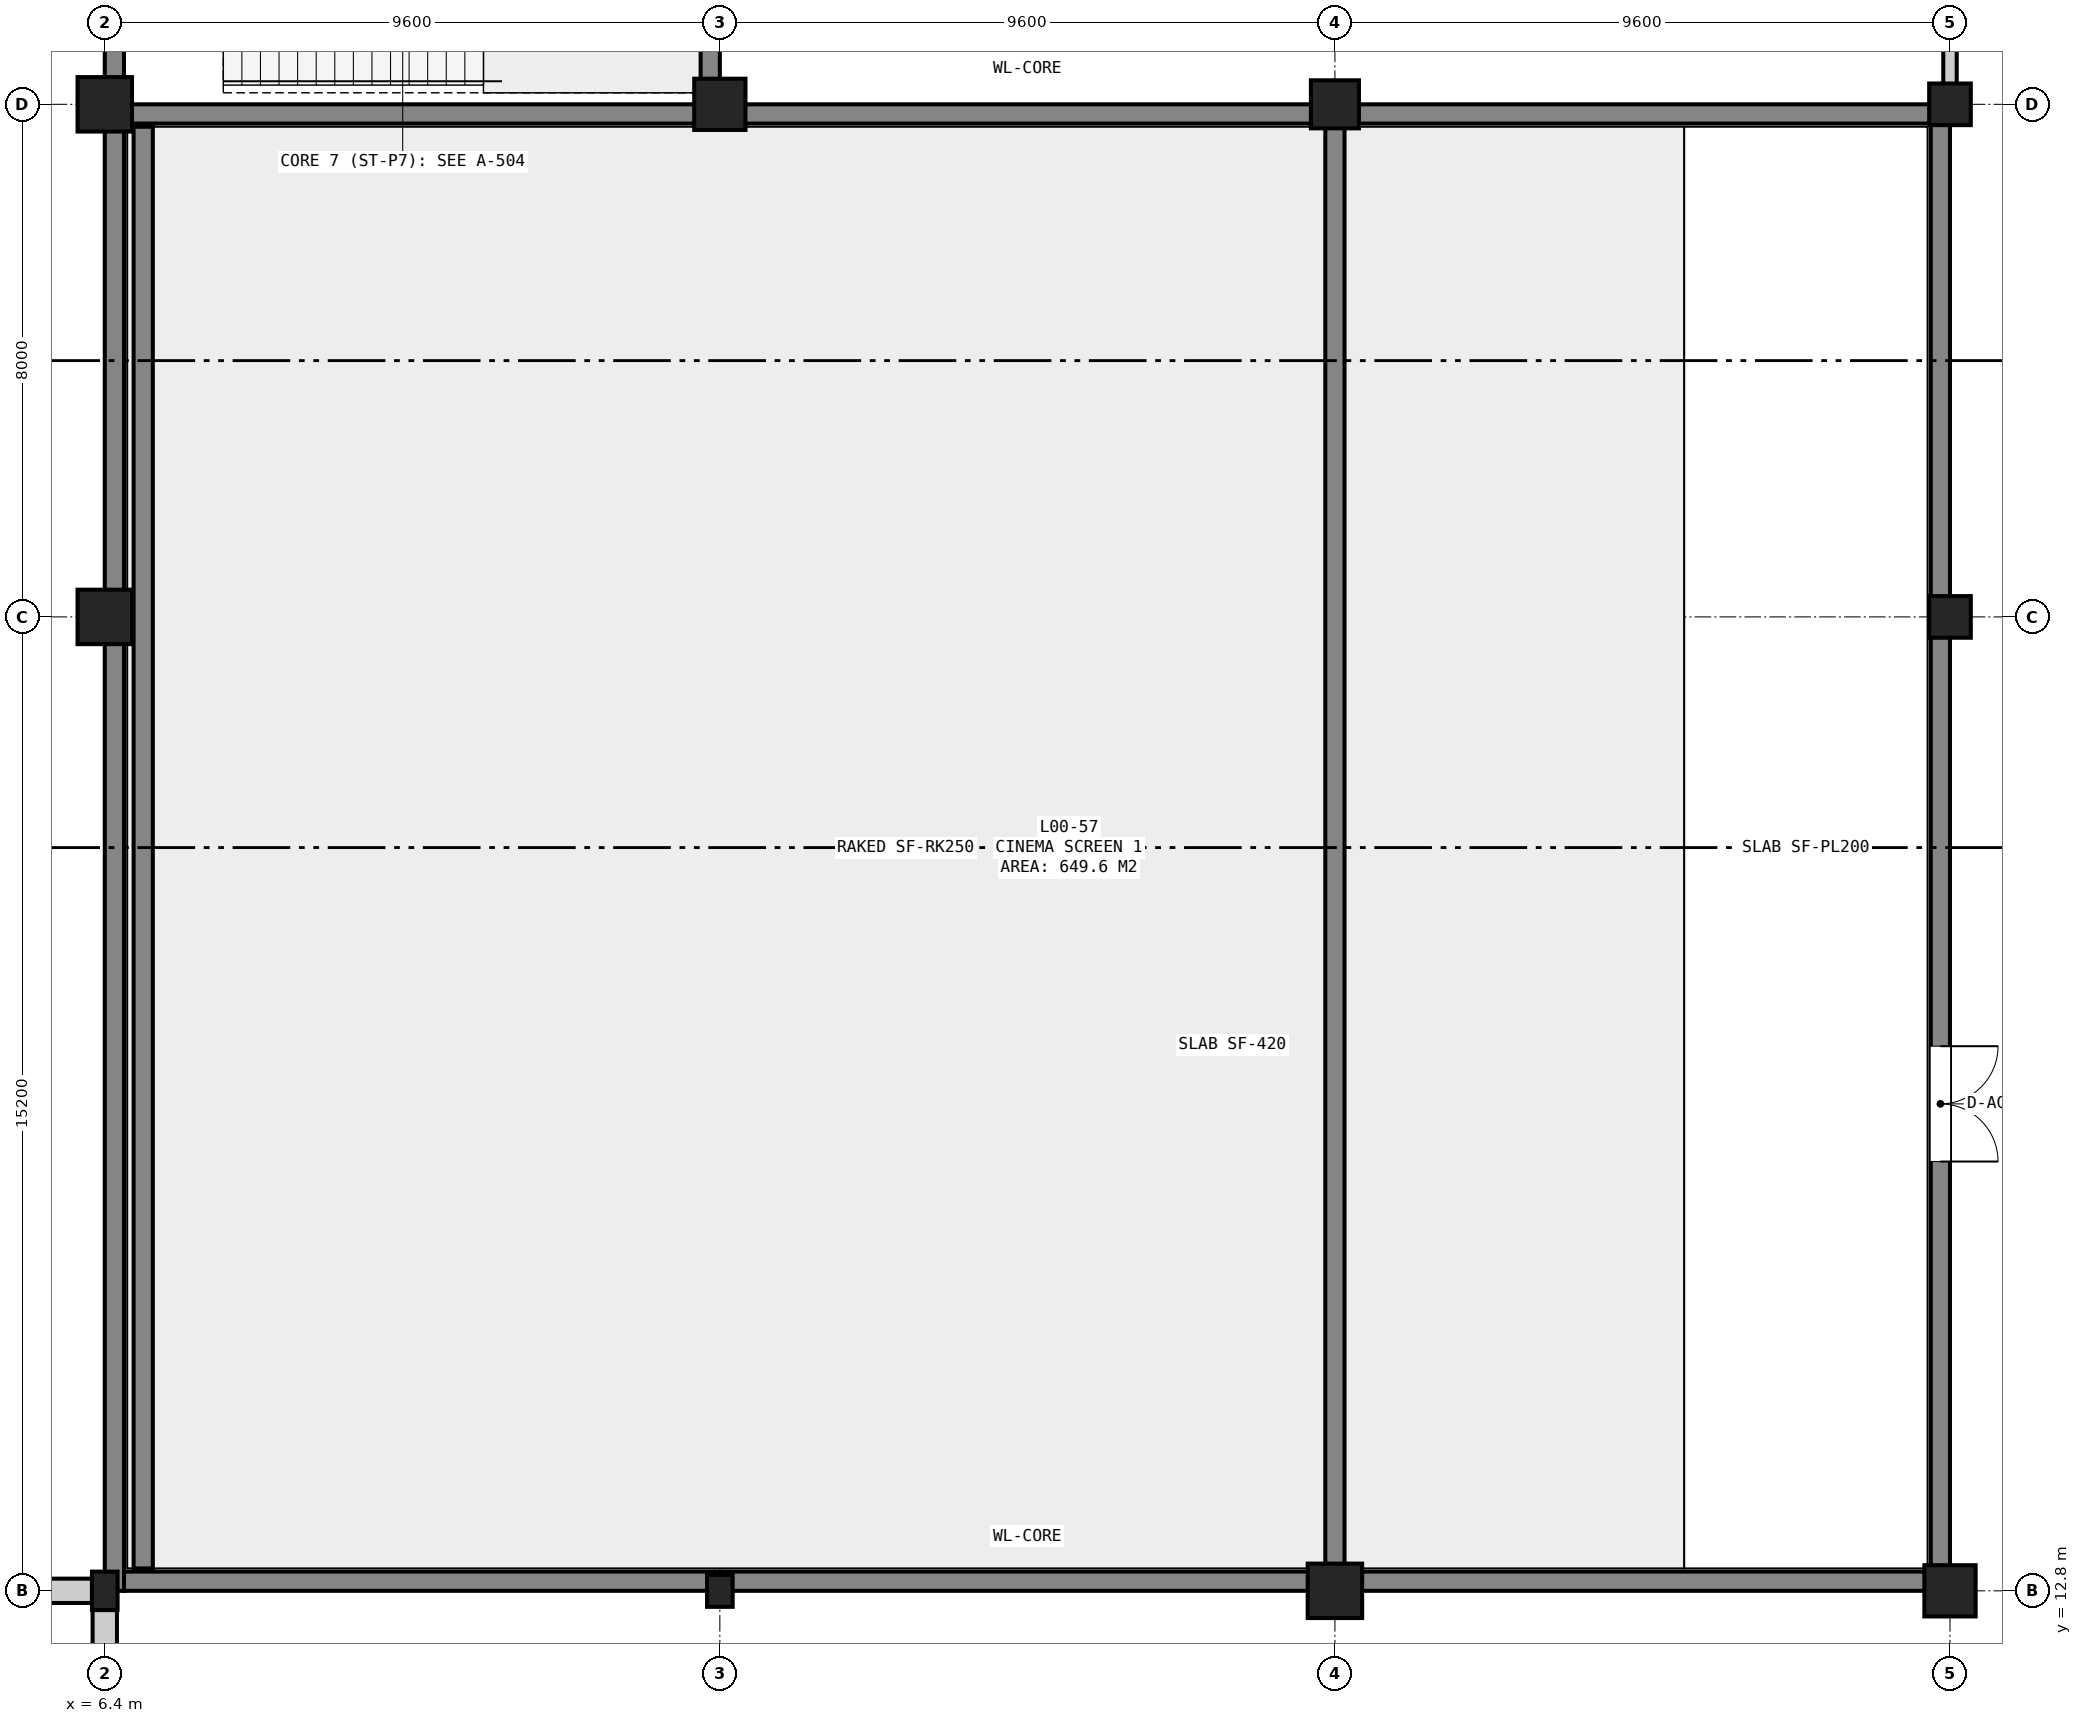
"""IFC4 building model, lengths in metres.
Left out: names, types, materials, properties, quantities, classifications, styles, units other than length and angle.
Written with IfcOpenShell. Run it as: python <this file> out.ifc"""

import sys

from ifc_helpers import new_model, si_unit, direction, frame, frame_2d, origin, origin_2d, place, context, subcontext, project, spatial, rectangle, extrude, element, fill, save


model = new_model("IFC4")
c1 = context("Model", 3, precision=1e-05, world=origin(), true_north=direction((0.0, 1.0)))
c2 = subcontext(c1, "Body", "Model", "MODEL_VIEW")
j1 = project(units=[si_unit("LENGTHUNIT", "METRE"), si_unit("PLANEANGLEUNIT", "RADIAN")], contexts=[c1])
p1 = place(None, origin())
s1 = spatial("IfcSite", under=j1, at=p1, CompositionType="ELEMENT")
p2 = place(p1, origin())
s2 = spatial("IfcBuilding", under=s1, at=p2, CompositionType="ELEMENT")
p3 = place(p2, origin())
s3 = spatial("IfcBuildingStorey", under=s2, at=p3, CompositionType="ELEMENT", Elevation=0.0)
p4 = place(p3, frame((6.4, 12.8, 0.0), z_axis=(0.0, 0.0, 1.0), x_axis=(1.0, 0.0, 0.0)))
e1 = element("IfcColumn", 1, at=p4, inside=s3, PredefinedType="COLUMN", context=c2, shape_type="SweptSolid", body=[
    extrude(rectangle(XDim=0.4, YDim=0.6, at=origin_2d()), origin(), (0.0, 0.0, 1.0), 5.4),
])
for number, where, z_axis, x_axis in (
    (2, (6.4, 28.0, 0.0), (0.0, 0.0, 1.0), (1.0, 0.0, 0.0)),
    (3, (6.4, 36.0, 0.0), (0.0, 0.0, 1.0), (1.0, 0.0, 0.0)),
):
    element("IfcColumn", number, at=place(p3, frame(where, z_axis=z_axis, x_axis=x_axis)), inside=s3, PredefinedType="COLUMN", context=c2, shape_type="SweptSolid", body=[
        extrude(rectangle(XDim=0.85, YDim=0.85, at=origin_2d()), origin(), (0.0, 0.0, 1.0), 5.4),
    ])
p5 = place(p3, frame((16.0, 12.8, 0.0), z_axis=(0.0, 0.0, 1.0), x_axis=(1.0, 0.0, 0.0)))
e4 = element("IfcColumn", 4, at=p5, inside=s3, PredefinedType="COLUMN", context=c2, shape_type="SweptSolid", body=[
    extrude(rectangle(XDim=0.4, YDim=0.5, at=origin_2d()), origin(), (0.0, 0.0, 1.0), 5.4),
])
p6 = place(p3, frame((16.0, 36.0, 0.0), z_axis=(0.0, 0.0, 1.0), x_axis=(1.0, 0.0, 0.0)))
e5 = element("IfcColumn", 5, at=p6, inside=s3, PredefinedType="COLUMN", context=c2, shape_type="SweptSolid", body=[
    extrude(rectangle(XDim=0.8, YDim=0.8, at=origin_2d()), origin(), (0.0, 0.0, 1.0), 5.4),
])
p7 = place(p3, frame((25.6, 12.8, 0.0), z_axis=(0.0, 0.0, 1.0), x_axis=(1.0, 0.0, 0.0)))
e6 = element("IfcColumn", 6, at=p7, inside=s3, PredefinedType="COLUMN", context=c2, shape_type="SweptSolid", body=[
    extrude(rectangle(XDim=0.85, YDim=0.85, at=origin_2d()), origin(), (0.0, 0.0, 1.0), 5.4),
])
p8 = place(p3, frame((25.6, 36.0, 0.0), z_axis=(0.0, 0.0, 1.0), x_axis=(1.0, 0.0, 0.0)))
e7 = element("IfcColumn", 7, at=p8, inside=s3, PredefinedType="COLUMN", context=c2, shape_type="SweptSolid", body=[
    extrude(rectangle(XDim=0.75, YDim=0.75, at=origin_2d()), origin(), (0.0, 0.0, 1.0), 5.4),
])
p9 = place(p3, frame((35.2, 12.8, 0.0), z_axis=(0.0, 0.0, 1.0), x_axis=(1.0, 0.0, 0.0)))
e8 = element("IfcColumn", 8, at=p9, inside=s3, PredefinedType="COLUMN", context=c2, shape_type="SweptSolid", body=[
    extrude(rectangle(XDim=0.8, YDim=0.8, at=origin_2d()), origin(), (0.0, 0.0, 1.0), 5.4),
])
for number, where, z_axis, x_axis in (
    (9, (35.2, 28.0, 0.0), (0.0, 0.0, 1.0), (1.0, 0.0, 0.0)),
    (10, (35.2, 36.0, 0.0), (0.0, 0.0, 1.0), (1.0, 0.0, 0.0)),
):
    element("IfcColumn", number, at=place(p3, frame(where, z_axis=z_axis, x_axis=x_axis)), inside=s3, PredefinedType="COLUMN", context=c2, shape_type="SweptSolid", body=[
        extrude(rectangle(XDim=0.65, YDim=0.65, at=origin_2d()), origin(), (0.0, 0.0, 1.0), 5.4),
    ])
p10 = place(p3, frame((25.6, 13.15, 0.0), z_axis=(0.0, 0.0, 1.0), x_axis=(0.0, 1.0, 0.0)))
e11 = element("IfcWall", 11, at=p10, inside=s3, PredefinedType="SHEAR", context=c2, shape_type="SweptSolid", body=[
    extrude(rectangle(XDim=22.5, YDim=0.3, at=frame_2d((11.25, 0.0))), origin(), (0.0, 0.0, 1.0), 0.784),
])
p11 = place(p3, frame((7.0, 13.15, 0.0), z_axis=(0.0, 0.0, 1.0), x_axis=(0.0, 1.0, 0.0)))
e12 = element("IfcWall", 12, at=p11, inside=s3, PredefinedType="SHEAR", context=c2, shape_type="SweptSolid", body=[
    extrude(rectangle(XDim=22.5, YDim=0.3, at=frame_2d((11.25, 0.0))), origin(), (0.0, 0.0, 1.0), 3.597),
])
p12 = place(p3, frame((0.325, 12.8, 0.0), z_axis=(0.0, 0.0, 1.0), x_axis=(1.0, 0.0, 0.0)))
e13 = element("IfcWall", 13, at=p12, inside=s3, PredefinedType="SOLIDWALL", context=c2, shape_type="SweptSolid", body=[
    extrude(rectangle(XDim=5.875, YDim=0.38, at=frame_2d((2.938, 0.0))), origin(), (0.0, 0.0, 1.0), 4.48),
])
p13 = place(p12, frame((2.262, 0.0, 0.9)))
e14 = element("IfcOpeningElement", 14, at=p13, cuts=e13, PredefinedType="OPENING", context=c2, shape_type="SweptSolid", body=[
    extrude(rectangle(XDim=1.35, YDim=1.75, at=frame_2d((0.675, 0.875))), frame((0.0, 0.202, 0.0), z_axis=(0.0, -1.0, 0.0), x_axis=(1.0, 0.0, 0.0)), (0.0, 0.0, 1.0), 0.404),
])
p14 = place(p3, frame((6.4, 12.5, 0.0), z_axis=(0.0, 0.0, 1.0), x_axis=(0.0, -1.0, 0.0)))
e15 = element("IfcWall", 15, at=p14, inside=s3, PredefinedType="SOLIDWALL", context=c2, shape_type="SweptSolid", body=[
    extrude(rectangle(XDim=12.125, YDim=0.38, at=frame_2d((6.062, 0.0))), origin(), (0.0, 0.0, 1.0), 4.065),
])
p15 = place(p14, frame((5.438, 0.0, 0.9)))
e16 = element("IfcOpeningElement", 16, at=p15, cuts=e15, PredefinedType="OPENING", context=c2, shape_type="SweptSolid", body=[
    extrude(rectangle(XDim=1.25, YDim=1.9, at=frame_2d((0.625, 0.95))), frame((0.0, 0.202, 0.0), z_axis=(0.0, -1.0, 0.0), x_axis=(1.0, 0.0, 0.0)), (0.0, 0.0, 1.0), 0.404),
])
for number, where, z_axis, x_axis in (
    (17, (6.7, 12.95, 0.0), (0.0, 0.0, 1.0), (1.0, 0.0, 0.0)),
    (18, (6.7, 35.85, 0.0), (0.0, 0.0, 1.0), (1.0, 0.0, 0.0)),
):
    element("IfcWall", number, at=place(p3, frame(where, z_axis=z_axis, x_axis=x_axis)), inside=s3, PredefinedType="SHEAR", context=c2, shape_type="SweptSolid", body=[
        extrude(rectangle(XDim=28.2, YDim=0.3, at=frame_2d((14.1, 0.0))), origin(), (0.0, 0.0, 1.0), 5.08),
    ])
p16 = place(p3, frame((6.55, 12.8, 0.0), z_axis=(0.0, 0.0, 1.0), x_axis=(0.0, 1.0, 0.0)))
e19 = element("IfcWall", 19, at=p16, inside=s3, PredefinedType="SHEAR", context=c2, shape_type="SweptSolid", body=[
    extrude(rectangle(XDim=23.2, YDim=0.3, at=frame_2d((11.6, 0.0))), origin(), (0.0, 0.0, 1.0), 5.08),
])
p17 = place(p3, frame((35.05, 12.8, 0.0), z_axis=(0.0, 0.0, 1.0), x_axis=(0.0, 1.0, 0.0)))
e20 = element("IfcWall", 20, at=p17, inside=s3, PredefinedType="SHEAR", context=c2, shape_type="SweptSolid", body=[
    extrude(rectangle(XDim=23.2, YDim=0.3, at=frame_2d((11.6, 0.0))), origin(), (0.0, 0.0, 1.0), 5.08),
])
p18 = place(p17, frame((6.7, 0.0, 0.0)))
e21 = element("IfcOpeningElement", 21, at=p18, cuts=e20, PredefinedType="OPENING", context=c2, shape_type="SweptSolid", body=[
    extrude(rectangle(XDim=1.8, YDim=2.3, at=frame_2d((0.9, 1.15))), frame((0.0, 0.162, 0.0), z_axis=(0.0, -1.0, 0.0), x_axis=(1.0, 0.0, 0.0)), (0.0, 0.0, 1.0), 0.324),
])
for number, where, z_axis, x_axis in (
    (22, (6.55, 36.0, 0.0), (0.0, 0.0, 1.0), (0.0, 1.0, 0.0)),
    (23, (15.85, 36.0, 0.0), (0.0, 0.0, 1.0), (0.0, 1.0, 0.0)),
):
    element("IfcWall", number, at=place(p3, frame(where, z_axis=z_axis, x_axis=x_axis)), inside=s3, PredefinedType="SHEAR", context=c2, shape_type="SweptSolid", body=[
        extrude(rectangle(XDim=4.2, YDim=0.3, at=frame_2d((2.1, 0.0))), origin(), (0.0, 0.0, 1.0), 5.08),
    ])
p19 = place(p3, frame((35.2, 36.14, 0.0), z_axis=(0.0, 0.0, 1.0), x_axis=(0.0, 1.0, 0.0)))
e24 = element("IfcWall", 24, at=p19, inside=s3, PredefinedType="SOLIDWALL", context=c2, shape_type="SweptSolid", body=[
    extrude(rectangle(XDim=6.92, YDim=0.21, at=frame_2d((3.46, 0.0))), origin(), (0.0, 0.0, 1.0), 4.375),
])
p20 = place(p19, frame((2.66, 0.0, 0.0)))
e25 = element("IfcOpeningElement", 25, at=p20, cuts=e24, PredefinedType="OPENING", context=c2, shape_type="SweptSolid", body=[
    extrude(rectangle(XDim=1.6, YDim=2.2, at=frame_2d((0.8, 1.1))), frame((0.0, 0.117, 0.0), z_axis=(0.0, -1.0, 0.0), x_axis=(1.0, 0.0, 0.0)), (0.0, 0.0, 1.0), 0.234),
])
p21 = place(p18, frame((1.8, 0.0, 0.0), z_axis=(0.0, 0.0, 1.0), x_axis=(-1.0, 0.0, 0.0)))
e26 = element("IfcDoor", 26, at=p21, inside=s3, OperationType="DOUBLE_DOOR_SINGLE_SWING", PredefinedType="DOOR", context=c2, shape_type="SweptSolid", body=[
    extrude(rectangle(XDim=1.8, YDim=2.3, at=frame_2d((0.9, 1.15))), frame((0.0, 0.025, 0.0), z_axis=(0.0, -1.0, 0.0), x_axis=(1.0, 0.0, 0.0)), (0.0, 0.0, 1.0), 0.05),
])
fill(e21, e26)
save(model, sys.argv[1])
